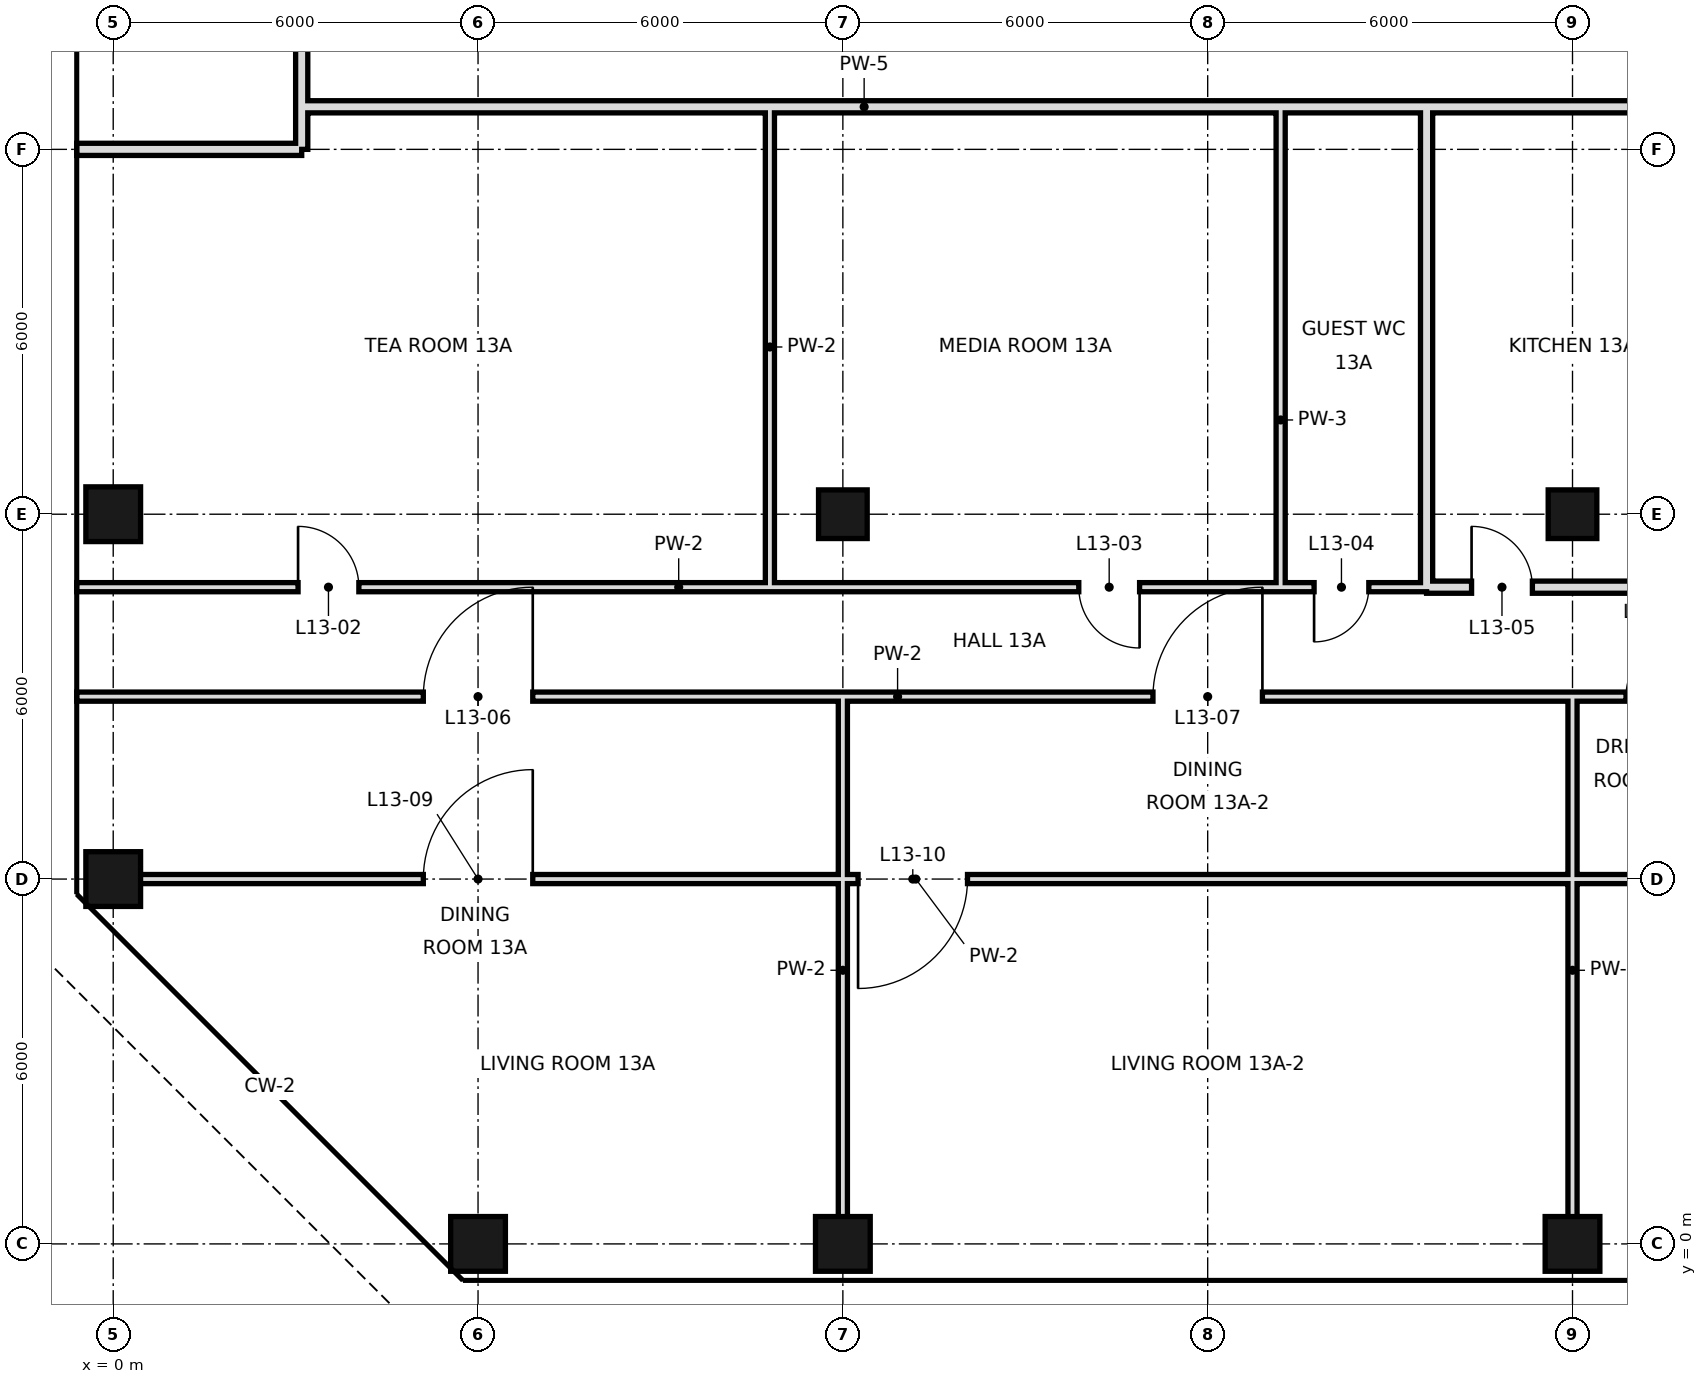
"""IFC4 building model, lengths in metres.
Left out: names, types, materials, properties, quantities, classifications, styles, units other than length and angle.
Written with IfcOpenShell. Run it as: python <this file> out.ifc"""

import sys

from ifc_helpers import new_model, si_unit, direction, frame, frame_2d, origin, origin_2d, place, context, subcontext, project, spatial, rectangle, hollow_rectangle, extrude, element, fill, save


model = new_model("IFC4")
c1 = context("Model", 3, precision=1e-05, world=origin(), true_north=direction((0.0, 1.0)))
c2 = subcontext(c1, "Body", "Model", "MODEL_VIEW")
j1 = project(units=[si_unit("LENGTHUNIT", "METRE"), si_unit("PLANEANGLEUNIT", "RADIAN")], contexts=[c1])
p1 = place(None, origin())
s1 = spatial("IfcSite", under=j1, at=p1, CompositionType="ELEMENT")
p2 = place(p1, origin())
s2 = spatial("IfcBuilding", under=s1, at=p2, CompositionType="ELEMENT")
p3 = place(p2, frame((0.0, 0.0, 67.8)))
s3 = spatial("IfcBuildingStorey", under=s2, at=p3, CompositionType="ELEMENT", Elevation=67.8)
for number, where, z_axis, x_axis in (
    (1, (0.0, 6.0, 0.0), (0.0, 0.0, 1.0), (1.0, 0.0, 0.0)),
    (2, (0.0, 12.0, 0.0), (0.0, 0.0, 1.0), (1.0, 0.0, 0.0)),
    (3, (6.0, 0.0, 0.0), (0.0, 0.0, 1.0), (1.0, 0.0, 0.0)),
    (4, (12.0, 0.0, 0.0), (0.0, 0.0, 1.0), (1.0, 0.0, 0.0)),
):
    element("IfcColumn", number, at=place(p3, frame(where, z_axis=z_axis, x_axis=x_axis)), inside=s3, PredefinedType="COLUMN", context=c2, shape_type="SweptSolid", body=[
        extrude(hollow_rectangle(XDim=0.9, YDim=0.9, WallThickness=0.045, at=origin_2d()), origin(), (0.0, 0.0, 1.0), 3.6),
    ])
p4 = place(p3, frame((12.0, 12.0, 0.0), z_axis=(0.0, 0.0, 1.0), x_axis=(1.0, 0.0, 0.0)))
e5 = element("IfcColumn", 5, at=p4, inside=s3, PredefinedType="COLUMN", context=c2, shape_type="SweptSolid", body=[
    extrude(hollow_rectangle(XDim=0.8, YDim=0.8, WallThickness=0.04, at=origin_2d()), origin(), (0.0, 0.0, 1.0), 3.6),
])
p5 = place(p3, frame((24.0, 0.0, 0.0), z_axis=(0.0, 0.0, 1.0), x_axis=(1.0, 0.0, 0.0)))
e6 = element("IfcColumn", 6, at=p5, inside=s3, PredefinedType="COLUMN", context=c2, shape_type="SweptSolid", body=[
    extrude(hollow_rectangle(XDim=0.9, YDim=0.9, WallThickness=0.045, at=origin_2d()), origin(), (0.0, 0.0, 1.0), 3.6),
])
p6 = place(p3, frame((24.0, 12.0, 0.0), z_axis=(0.0, 0.0, 1.0), x_axis=(1.0, 0.0, 0.0)))
e7 = element("IfcColumn", 7, at=p6, inside=s3, PredefinedType="COLUMN", context=c2, shape_type="SweptSolid", body=[
    extrude(hollow_rectangle(XDim=0.8, YDim=0.8, WallThickness=0.04, at=origin_2d()), origin(), (0.0, 0.0, 1.0), 3.6),
])
p7 = place(p3, frame((10.8, 10.8, 0.0), z_axis=(0.0, 0.0, 1.0), x_axis=(0.0, 1.0, 0.0)))
e8 = element("IfcWall", 8, at=p7, inside=s3, PredefinedType="PARTITIONING", context=c2, shape_type="SweptSolid", body=[
    extrude(rectangle(XDim=7.9, YDim=0.15, at=frame_2d((3.95, 0.0))), origin(), (0.0, 0.0, 1.0), 3.42),
])
p8 = place(p3, frame((12.0, 0.0, 0.0), z_axis=(0.0, 0.0, 1.0), x_axis=(0.0, 1.0, 0.0)))
e9 = element("IfcWall", 9, at=p8, inside=s3, PredefinedType="PARTITIONING", context=c2, shape_type="SweptSolid", body=[
    extrude(rectangle(XDim=9.0, YDim=0.15, at=frame_2d((4.5, 0.0))), origin(), (0.0, 0.0, 1.0), 2.72),
])
p9 = place(p3, frame((19.2, 10.8, 0.0), z_axis=(0.0, 0.0, 1.0), x_axis=(0.0, 1.0, 0.0)))
e10 = element("IfcWall", 10, at=p9, inside=s3, PredefinedType="PARTITIONING", context=c2, shape_type="SweptSolid", body=[
    extrude(rectangle(XDim=7.9, YDim=0.15, at=frame_2d((3.95, 0.0))), origin(), (0.0, 0.0, 1.0), 3.42),
])
p10 = place(p3, frame((21.6, 10.8, 0.0), z_axis=(0.0, 0.0, 1.0), x_axis=(0.0, 1.0, 0.0)))
e11 = element("IfcWall", 11, at=p10, inside=s3, PredefinedType="SOLIDWALL", context=c2, shape_type="SweptSolid", body=[
    extrude(rectangle(XDim=7.9, YDim=0.2, at=frame_2d((3.95, 0.0))), origin(), (0.0, 0.0, 1.0), 2.72),
])
p11 = place(p3, frame((24.0, 0.0, 0.0), z_axis=(0.0, 0.0, 1.0), x_axis=(0.0, 1.0, 0.0)))
e12 = element("IfcWall", 12, at=p11, inside=s3, PredefinedType="PARTITIONING", context=c2, shape_type="SweptSolid", body=[
    extrude(rectangle(XDim=9.0, YDim=0.15, at=frame_2d((4.5, 0.0))), origin(), (0.0, 0.0, 1.0), 2.72),
])
p12 = place(p3, frame((3.1, 18.0, 0.0), z_axis=(0.0, 0.0, 1.0), x_axis=(0.0, 1.0, 0.0)))
e13 = element("IfcWall", 13, at=p12, inside=s3, PredefinedType="SOLIDWALL", context=c2, shape_type="SweptSolid", body=[
    extrude(rectangle(XDim=27.949, YDim=0.2, at=frame_2d((13.975, 0.0))), origin(), (0.0, 0.0, 1.0), 2.97),
])
p13 = place(p12, frame((8.36, 0.0, 0.0)))
e14 = element("IfcOpeningElement", 14, at=p13, cuts=e13, PredefinedType="OPENING", context=c2, shape_type="SweptSolid", body=[
    extrude(rectangle(XDim=1.2, YDim=2.4, at=frame_2d((0.6, 1.2))), frame((0.0, 0.11, 0.0), z_axis=(0.0, -1.0, 0.0), x_axis=(1.0, 0.0, 0.0)), (0.0, 0.0, 1.0), 0.22),
])
p14 = place(p3, frame((21.6, 10.8, 0.0), z_axis=(0.0, 0.0, 1.0), x_axis=(1.0, 0.0, 0.0)))
e15 = element("IfcWall", 15, at=p14, inside=s3, PredefinedType="SOLIDWALL", context=c2, shape_type="SweptSolid", body=[
    extrude(rectangle(XDim=4.8, YDim=0.2, at=frame_2d((2.4, 0.0))), origin(), (0.0, 0.0, 1.0), 2.72),
])
p15 = place(p14, frame((0.74, 0.0, 0.0)))
e16 = element("IfcOpeningElement", 16, at=p15, cuts=e15, PredefinedType="OPENING", context=c2, shape_type="SweptSolid", body=[
    extrude(rectangle(XDim=1.0, YDim=2.4, at=frame_2d((0.5, 1.2))), frame((0.0, 0.11, 0.0), z_axis=(0.0, -1.0, 0.0), x_axis=(1.0, 0.0, 0.0)), (0.0, 0.0, 1.0), 0.22),
])
p16 = place(p3, frame((-0.6, 10.8, 0.0), z_axis=(0.0, 0.0, 1.0), x_axis=(1.0, 0.0, 0.0)))
e17 = element("IfcWall", 17, at=p16, inside=s3, PredefinedType="PARTITIONING", context=c2, shape_type="SweptSolid", body=[
    extrude(rectangle(XDim=19.8, YDim=0.15, at=frame_2d((9.9, 0.0))), origin(), (0.0, 0.0, 1.0), 3.42),
])
p17 = place(p16, frame((3.64, 0.0, 0.0)))
e18 = element("IfcOpeningElement", 18, at=p17, cuts=e17, PredefinedType="OPENING", context=c2, shape_type="SweptSolid", body=[
    extrude(rectangle(XDim=1.0, YDim=2.4, at=frame_2d((0.5, 1.2))), frame((0.0, 0.085, 0.0), z_axis=(0.0, -1.0, 0.0), x_axis=(1.0, 0.0, 0.0)), (0.0, 0.0, 1.0), 0.17),
])
p18 = place(p16, frame((16.48, 0.0, 0.0)))
e19 = element("IfcOpeningElement", 19, at=p18, cuts=e17, PredefinedType="OPENING", context=c2, shape_type="SweptSolid", body=[
    extrude(rectangle(XDim=1.0, YDim=2.4, at=frame_2d((0.5, 1.2))), frame((0.0, 0.085, 0.0), z_axis=(0.0, -1.0, 0.0), x_axis=(1.0, 0.0, 0.0)), (0.0, 0.0, 1.0), 0.17),
])
p19 = place(p3, frame((19.2, 10.8, 0.0), z_axis=(0.0, 0.0, 1.0), x_axis=(1.0, 0.0, 0.0)))
e20 = element("IfcWall", 20, at=p19, inside=s3, PredefinedType="PARTITIONING", context=c2, shape_type="SweptSolid", body=[
    extrude(rectangle(XDim=2.4, YDim=0.15, at=frame_2d((1.2, 0.0))), origin(), (0.0, 0.0, 1.0), 3.42),
])
p20 = place(p19, frame((0.55, 0.0, 0.0)))
e21 = element("IfcOpeningElement", 21, at=p20, cuts=e20, PredefinedType="OPENING", context=c2, shape_type="SweptSolid", body=[
    extrude(rectangle(XDim=0.9, YDim=2.4, at=frame_2d((0.45, 1.2))), frame((0.0, 0.085, 0.0), z_axis=(0.0, -1.0, 0.0), x_axis=(1.0, 0.0, 0.0)), (0.0, 0.0, 1.0), 0.17),
])
p21 = place(p3, frame((-0.6, 18.0, 0.0), z_axis=(0.0, 0.0, 1.0), x_axis=(1.0, 0.0, 0.0)))
e22 = element("IfcWall", 22, at=p21, inside=s3, PredefinedType="SOLIDWALL", context=c2, shape_type="SweptSolid", body=[
    extrude(rectangle(XDim=3.7, YDim=0.2, at=frame_2d((1.85, 0.0))), origin(), (0.0, 0.0, 1.0), 2.72),
])
p22 = place(p3, frame((3.1, 18.7, 0.0), z_axis=(0.0, 0.0, 1.0), x_axis=(1.0, 0.0, 0.0)))
e23 = element("IfcWall", 23, at=p22, inside=s3, PredefinedType="SOLIDWALL", context=c2, shape_type="SweptSolid", body=[
    extrude(rectangle(XDim=18.5, YDim=0.2, at=frame_2d((9.25, 0.0))), origin(), (0.0, 0.0, 1.0), 2.72),
])
p23 = place(p3, frame((21.6, 18.7, 0.0), z_axis=(0.0, 0.0, 1.0), x_axis=(1.0, 0.0, 0.0)))
e24 = element("IfcWall", 24, at=p23, inside=s3, PredefinedType="SOLIDWALL", context=c2, shape_type="SweptSolid", body=[
    extrude(rectangle(XDim=4.8, YDim=0.2, at=frame_2d((2.4, 0.0))), origin(), (0.0, 0.0, 1.0), 3.42),
])
p24 = place(p3, frame((0.0, 6.0, 0.0), z_axis=(0.0, 0.0, 1.0), x_axis=(1.0, 0.0, 0.0)))
e25 = element("IfcWall", 25, at=p24, inside=s3, PredefinedType="PARTITIONING", context=c2, shape_type="SweptSolid", body=[
    extrude(rectangle(XDim=26.4, YDim=0.15, at=frame_2d((13.2, 0.0))), origin(), (0.0, 0.0, 1.0), 2.97),
])
p25 = place(p24, frame((5.1, 0.0, 0.0)))
e26 = element("IfcOpeningElement", 26, at=p25, cuts=e25, PredefinedType="OPENING", context=c2, shape_type="SweptSolid", body=[
    extrude(rectangle(XDim=1.8, YDim=2.4, at=frame_2d((0.9, 1.2))), frame((0.0, 0.085, 0.0), z_axis=(0.0, -1.0, 0.0), x_axis=(1.0, 0.0, 0.0)), (0.0, 0.0, 1.0), 0.17),
])
p26 = place(p24, frame((12.25, 0.0, 0.0)))
e27 = element("IfcOpeningElement", 27, at=p26, cuts=e25, PredefinedType="OPENING", context=c2, shape_type="SweptSolid", body=[
    extrude(rectangle(XDim=1.8, YDim=2.4, at=frame_2d((0.9, 1.2))), frame((0.0, 0.085, 0.0), z_axis=(0.0, -1.0, 0.0), x_axis=(1.0, 0.0, 0.0)), (0.0, 0.0, 1.0), 0.17),
])
p27 = place(p24, frame((25.15, 0.0, 0.0)))
e28 = element("IfcOpeningElement", 28, at=p27, cuts=e25, PredefinedType="OPENING", context=c2, shape_type="SweptSolid", body=[
    extrude(rectangle(XDim=1.0, YDim=2.4, at=frame_2d((0.5, 1.2))), frame((0.0, 0.085, 0.0), z_axis=(0.0, -1.0, 0.0), x_axis=(1.0, 0.0, 0.0)), (0.0, 0.0, 1.0), 0.17),
])
p28 = place(p3, frame((-0.6, 9.0, 0.0), z_axis=(0.0, 0.0, 1.0), x_axis=(1.0, 0.0, 0.0)))
e29 = element("IfcWall", 29, at=p28, inside=s3, PredefinedType="PARTITIONING", context=c2, shape_type="SweptSolid", body=[
    extrude(rectangle(XDim=27.0, YDim=0.15, at=frame_2d((13.5, 0.0))), origin(), (0.0, 0.0, 1.0), 3.42),
])
p29 = place(p28, frame((5.7, 0.0, 0.0)))
e30 = element("IfcOpeningElement", 30, at=p29, cuts=e29, PredefinedType="OPENING", context=c2, shape_type="SweptSolid", body=[
    extrude(rectangle(XDim=1.8, YDim=2.4, at=frame_2d((0.9, 1.2))), frame((0.0, 0.085, 0.0), z_axis=(0.0, -1.0, 0.0), x_axis=(1.0, 0.0, 0.0)), (0.0, 0.0, 1.0), 0.17),
])
p30 = place(p28, frame((17.7, 0.0, 0.0)))
e31 = element("IfcOpeningElement", 31, at=p30, cuts=e29, PredefinedType="OPENING", context=c2, shape_type="SweptSolid", body=[
    extrude(rectangle(XDim=1.8, YDim=2.4, at=frame_2d((0.9, 1.2))), frame((0.0, 0.085, 0.0), z_axis=(0.0, -1.0, 0.0), x_axis=(1.0, 0.0, 0.0)), (0.0, 0.0, 1.0), 0.17),
])
p31 = place(p28, frame((25.48, 0.0, 0.0)))
e32 = element("IfcOpeningElement", 32, at=p31, cuts=e29, PredefinedType="OPENING", context=c2, shape_type="SweptSolid", body=[
    extrude(rectangle(XDim=1.0, YDim=2.4, at=frame_2d((0.5, 1.2))), frame((0.0, 0.085, 0.0), z_axis=(0.0, -1.0, 0.0), x_axis=(1.0, 0.0, 0.0)), (0.0, 0.0, 1.0), 0.17),
])
p32 = place(p17, origin())
e33 = element("IfcDoor", 33, at=p32, inside=s3, OperationType="SINGLE_SWING_LEFT", PredefinedType="DOOR", context=c2, shape_type="SweptSolid", body=[
    extrude(rectangle(XDim=1.0, YDim=2.4, at=frame_2d((0.5, 1.2))), frame((0.0, 0.025, 0.0), z_axis=(0.0, -1.0, 0.0), x_axis=(1.0, 0.0, 0.0)), (0.0, 0.0, 1.0), 0.05),
])
fill(e18, e33)
p33 = place(p18, origin())
e34 = element("IfcDoor", 34, at=p33, inside=s3, OperationType="SINGLE_SWING_RIGHT", PredefinedType="DOOR", context=c2, shape_type="SweptSolid", body=[
    extrude(rectangle(XDim=1.0, YDim=2.4, at=frame_2d((0.5, 1.2))), frame((0.0, 0.025, 0.0), z_axis=(0.0, -1.0, 0.0), x_axis=(1.0, 0.0, 0.0)), (0.0, 0.0, 1.0), 0.05),
])
fill(e19, e34)
p34 = place(p20, frame((0.9, 0.0, 0.0), z_axis=(0.0, 0.0, 1.0), x_axis=(-1.0, 0.0, 0.0)))
e35 = element("IfcDoor", 35, at=p34, inside=s3, OperationType="SINGLE_SWING_RIGHT", PredefinedType="DOOR", context=c2, shape_type="SweptSolid", body=[
    extrude(rectangle(XDim=0.9, YDim=2.4, at=frame_2d((0.45, 1.2))), frame((0.0, 0.025, 0.0), z_axis=(0.0, -1.0, 0.0), x_axis=(1.0, 0.0, 0.0)), (0.0, 0.0, 1.0), 0.05),
])
fill(e21, e35)
p35 = place(p15, origin())
e36 = element("IfcDoor", 36, at=p35, inside=s3, OperationType="SINGLE_SWING_LEFT", PredefinedType="DOOR", context=c2, shape_type="SweptSolid", body=[
    extrude(rectangle(XDim=1.0, YDim=2.4, at=frame_2d((0.5, 1.2))), frame((0.0, 0.025, 0.0), z_axis=(0.0, -1.0, 0.0), x_axis=(1.0, 0.0, 0.0)), (0.0, 0.0, 1.0), 0.05),
])
fill(e16, e36)
p36 = place(p29, frame((1.8, 0.0, 0.0), z_axis=(0.0, 0.0, 1.0), x_axis=(-1.0, 0.0, 0.0)))
e37 = element("IfcDoor", 37, at=p36, inside=s3, OperationType="SINGLE_SWING_LEFT", PredefinedType="DOOR", context=c2, shape_type="SweptSolid", body=[
    extrude(rectangle(XDim=1.8, YDim=2.4, at=frame_2d((0.9, 1.2))), frame((0.0, 0.025, 0.0), z_axis=(0.0, -1.0, 0.0), x_axis=(1.0, 0.0, 0.0)), (0.0, 0.0, 1.0), 0.05),
])
fill(e30, e37)
p37 = place(p30, frame((1.8, 0.0, 0.0), z_axis=(0.0, 0.0, 1.0), x_axis=(-1.0, 0.0, 0.0)))
e38 = element("IfcDoor", 38, at=p37, inside=s3, OperationType="SINGLE_SWING_LEFT", PredefinedType="DOOR", context=c2, shape_type="SweptSolid", body=[
    extrude(rectangle(XDim=1.8, YDim=2.4, at=frame_2d((0.9, 1.2))), frame((0.0, 0.025, 0.0), z_axis=(0.0, -1.0, 0.0), x_axis=(1.0, 0.0, 0.0)), (0.0, 0.0, 1.0), 0.05),
])
fill(e31, e38)
p38 = place(p31, frame((1.0, 0.0, 0.0), z_axis=(0.0, 0.0, 1.0), x_axis=(-1.0, 0.0, 0.0)))
e39 = element("IfcDoor", 39, at=p38, inside=s3, OperationType="SINGLE_SWING_LEFT", PredefinedType="DOOR", context=c2, shape_type="SweptSolid", body=[
    extrude(rectangle(XDim=1.0, YDim=2.4, at=frame_2d((0.5, 1.2))), frame((0.0, 0.025, 0.0), z_axis=(0.0, -1.0, 0.0), x_axis=(1.0, 0.0, 0.0)), (0.0, 0.0, 1.0), 0.05),
])
fill(e32, e39)
p39 = place(p25, frame((1.8, 0.0, 0.0), z_axis=(0.0, 0.0, 1.0), x_axis=(-1.0, 0.0, 0.0)))
e40 = element("IfcDoor", 40, at=p39, inside=s3, OperationType="SINGLE_SWING_LEFT", PredefinedType="DOOR", context=c2, shape_type="SweptSolid", body=[
    extrude(rectangle(XDim=1.8, YDim=2.4, at=frame_2d((0.9, 1.2))), frame((0.0, 0.025, 0.0), z_axis=(0.0, -1.0, 0.0), x_axis=(1.0, 0.0, 0.0)), (0.0, 0.0, 1.0), 0.05),
])
fill(e26, e40)
p40 = place(p26, frame((1.8, 0.0, 0.0), z_axis=(0.0, 0.0, 1.0), x_axis=(-1.0, 0.0, 0.0)))
e41 = element("IfcDoor", 41, at=p40, inside=s3, OperationType="SINGLE_SWING_RIGHT", PredefinedType="DOOR", context=c2, shape_type="SweptSolid", body=[
    extrude(rectangle(XDim=1.8, YDim=2.4, at=frame_2d((0.9, 1.2))), frame((0.0, 0.025, 0.0), z_axis=(0.0, -1.0, 0.0), x_axis=(1.0, 0.0, 0.0)), (0.0, 0.0, 1.0), 0.05),
])
fill(e27, e41)
save(model, sys.argv[1])
